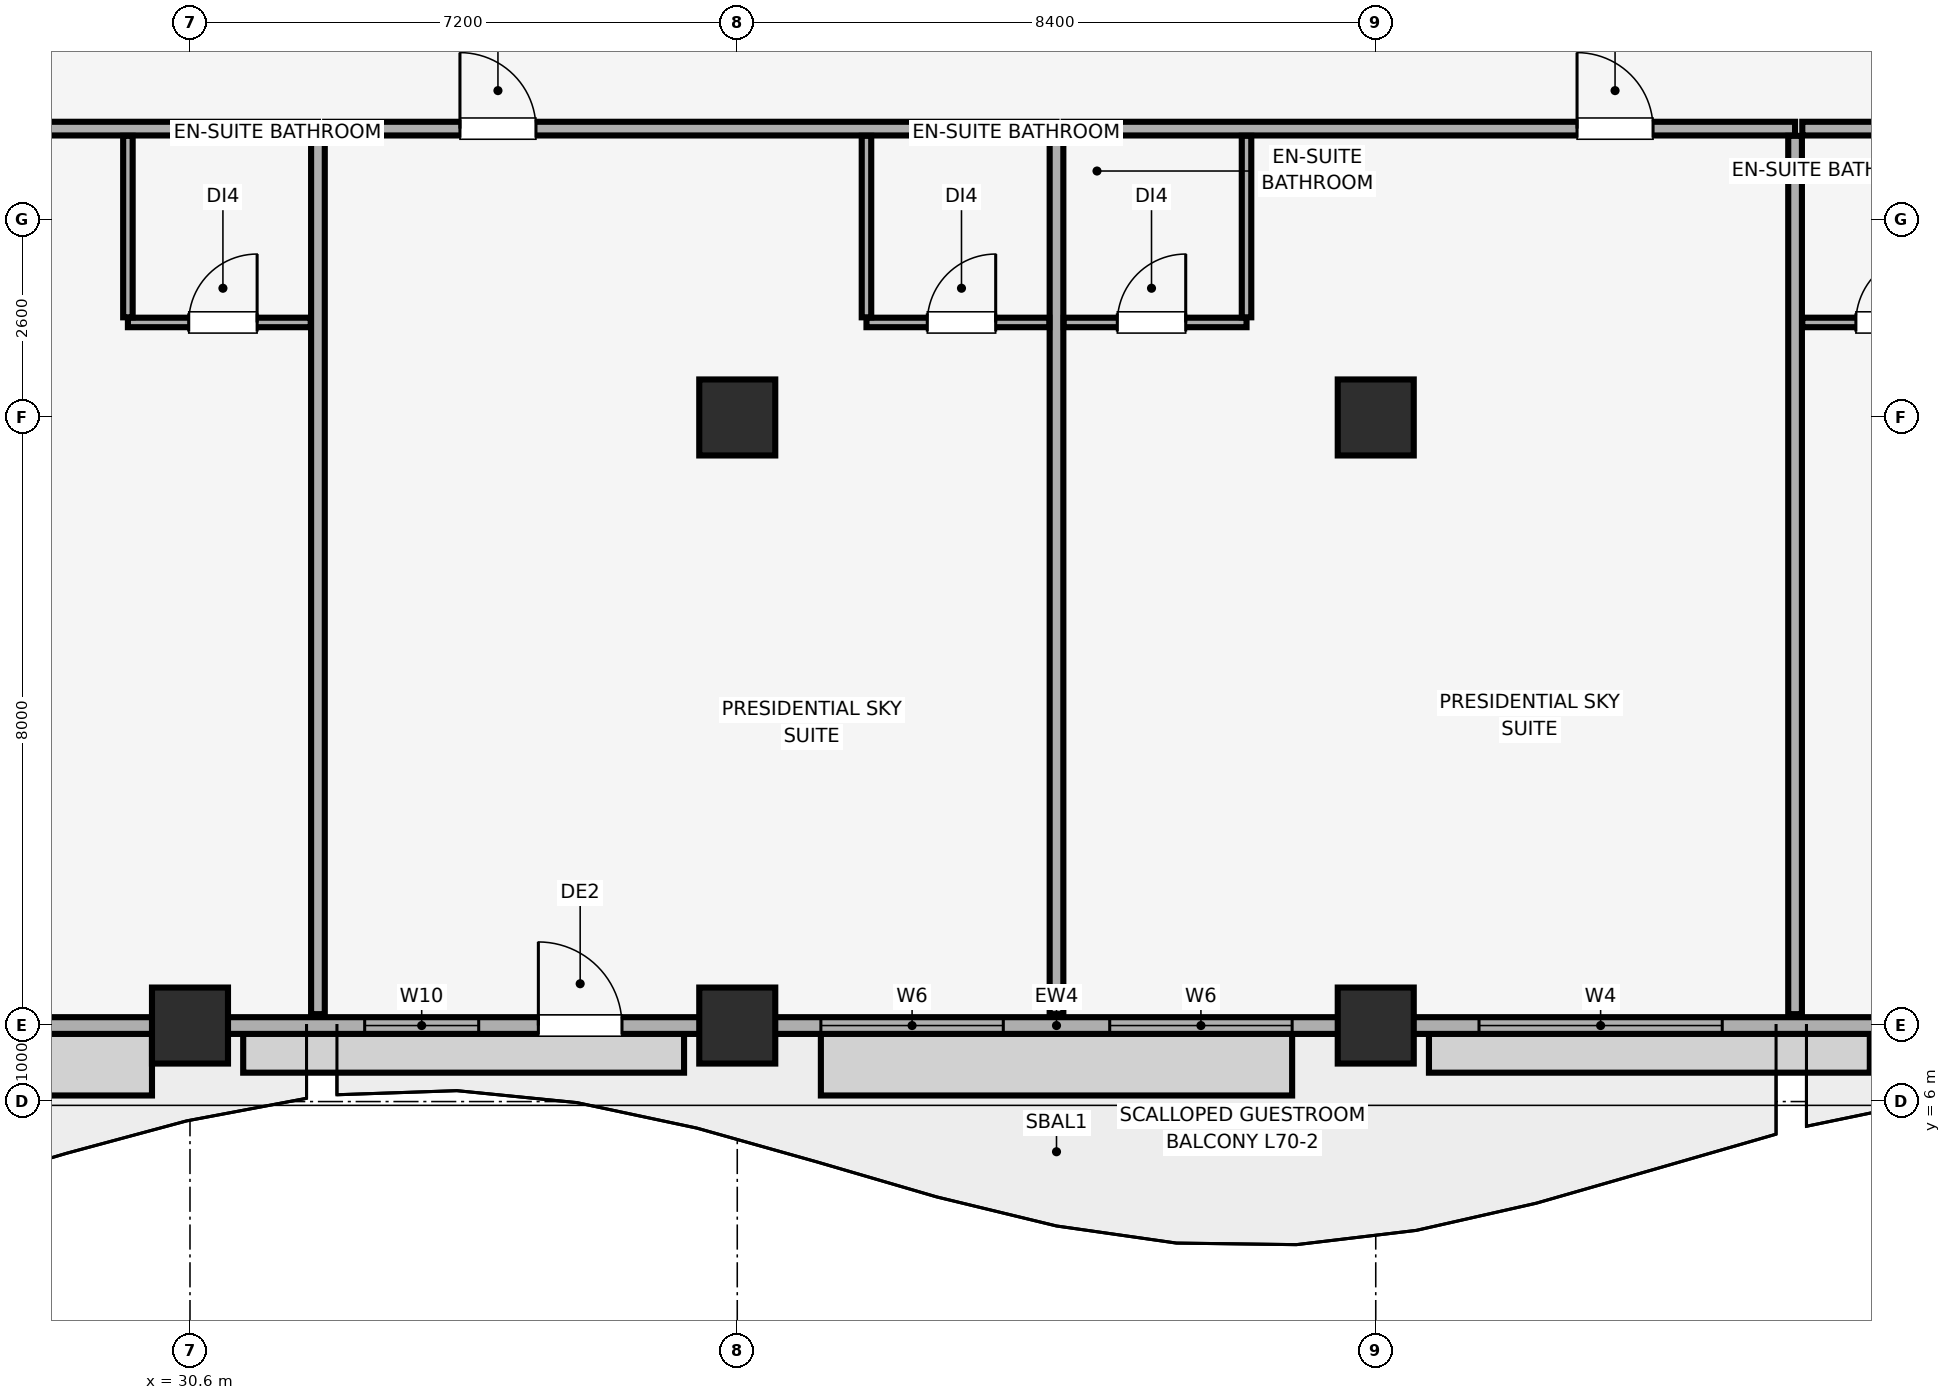
"""IFC4 building model, lengths in metres.
Left out: names, types, materials, properties, quantities, classifications, styles, units other than length and angle.
Written with IfcOpenShell. Run it as: python <this file> out.ifc"""

import sys

from ifc_helpers import new_model, si_unit, direction, frame, frame_2d, origin, origin_2d, place, context, subcontext, project, spatial, rectangle, extrude, element, fill, save


model = new_model("IFC4")
c1 = context("Model", 3, precision=1e-05, world=origin(), true_north=direction((0.0, 1.0)))
c2 = subcontext(c1, "Body", "Model", "MODEL_VIEW")
j1 = project(units=[si_unit("LENGTHUNIT", "METRE"), si_unit("PLANEANGLEUNIT", "RADIAN")], contexts=[c1])
p1 = place(None, origin())
s1 = spatial("IfcSite", under=j1, at=p1, CompositionType="ELEMENT")
p2 = place(p1, origin())
s2 = spatial("IfcBuilding", under=s1, at=p2, CompositionType="ELEMENT")
p3 = place(p2, frame((0.0, 0.0, 285.9)))
s3 = spatial("IfcBuildingStorey", under=s2, at=p3, CompositionType="ELEMENT", Elevation=285.9)
for number, where, z_axis, x_axis in (
    (1, (30.6, 7.0, 0.0), (0.0, 0.0, 1.0), (1.0, 0.0, 0.0)),
    (2, (37.8, 7.0, 0.0), (0.0, 0.0, 1.0), (1.0, 0.0, 0.0)),
    (3, (46.2, 7.0, 0.0), (0.0, 0.0, 1.0), (1.0, 0.0, 0.0)),
    (4, (37.8, 15.0, 0.0), (0.0, 0.0, 1.0), (1.0, 0.0, 0.0)),
    (5, (46.2, 15.0, 0.0), (0.0, 0.0, 1.0), (1.0, 0.0, 0.0)),
):
    element("IfcColumn", number, at=place(p3, frame(where, z_axis=z_axis, x_axis=x_axis)), inside=s3, PredefinedType="COLUMN", context=c2, shape_type="SweptSolid", body=[
        extrude(rectangle(XDim=1.0, YDim=1.0, at=origin_2d()), origin(), (0.0, 0.0, 1.0), 4.1),
    ])
p4 = place(p3, frame((12.6, 7.0, 0.0), z_axis=(0.0, 0.0, 1.0), x_axis=(1.0, 0.0, 0.0)))
e6 = element("IfcWall", 6, at=p4, inside=s3, PredefinedType="SOLIDWALL", context=c2, shape_type="SweptSolid", body=[
    extrude(rectangle(XDim=58.8, YDim=0.22, at=frame_2d((29.4, 0.0))), origin(), (0.0, 0.0, 1.0), 3.3),
])
p5 = place(p4, frame((7.917, 0.0, 0.0)))
e7 = element("IfcOpeningElement", 7, at=p5, cuts=e6, PredefinedType="OPENING", context=c2, shape_type="SweptSolid", body=[
    extrude(rectangle(XDim=1.1, YDim=2.15, at=frame_2d((0.55, 1.075))), frame((0.0, 0.12, 0.0), z_axis=(0.0, -1.0, 0.0), x_axis=(1.0, 0.0, 0.0)), (0.0, 0.0, 1.0), 0.24),
])
p6 = place(p4, frame((22.583, 0.0, 0.0)))
e8 = element("IfcOpeningElement", 8, at=p6, cuts=e6, PredefinedType="OPENING", context=c2, shape_type="SweptSolid", body=[
    extrude(rectangle(XDim=1.1, YDim=2.15, at=frame_2d((0.55, 1.075))), frame((0.0, 0.12, 0.0), z_axis=(0.0, -1.0, 0.0), x_axis=(1.0, 0.0, 0.0)), (0.0, 0.0, 1.0), 0.24),
])
p7 = place(p4, frame((49.783, 0.0, 0.0)))
e9 = element("IfcOpeningElement", 9, at=p7, cuts=e6, PredefinedType="OPENING", context=c2, shape_type="SweptSolid", body=[
    extrude(rectangle(XDim=1.1, YDim=2.15, at=frame_2d((0.55, 1.075))), frame((0.0, 0.12, 0.0), z_axis=(0.0, -1.0, 0.0), x_axis=(1.0, 0.0, 0.0)), (0.0, 0.0, 1.0), 0.24),
])
p8 = place(p4, frame((0.885, 0.0, 0.85)))
e10 = element("IfcOpeningElement", 10, at=p8, cuts=e6, PredefinedType="OPENING", context=c2, shape_type="SweptSolid", body=[
    extrude(rectangle(XDim=1.5, YDim=1.4, at=frame_2d((0.75, 0.7))), frame((0.0, 0.12, 0.0), z_axis=(0.0, -1.0, 0.0), x_axis=(1.0, 0.0, 0.0)), (0.0, 0.0, 1.0), 0.24),
])
p9 = place(p4, frame((4.673, 0.0, 0.85)))
e11 = element("IfcOpeningElement", 11, at=p9, cuts=e6, PredefinedType="OPENING", context=c2, shape_type="SweptSolid", body=[
    extrude(rectangle(XDim=2.4, YDim=1.5, at=frame_2d((1.2, 0.75))), frame((0.0, 0.12, 0.0), z_axis=(0.0, -1.0, 0.0), x_axis=(1.0, 0.0, 0.0)), (0.0, 0.0, 1.0), 0.24),
])
p10 = place(p4, frame((12.8, 0.0, 0.85)))
e12 = element("IfcOpeningElement", 12, at=p10, cuts=e6, PredefinedType="OPENING", context=c2, shape_type="SweptSolid", body=[
    extrude(rectangle(XDim=3.2, YDim=1.85, at=frame_2d((1.6, 0.925))), frame((0.0, 0.12, 0.0), z_axis=(0.0, -1.0, 0.0), x_axis=(1.0, 0.0, 0.0)), (0.0, 0.0, 1.0), 0.24),
])
p11 = place(p4, frame((20.298, 0.0, 0.85)))
e13 = element("IfcOpeningElement", 13, at=p11, cuts=e6, PredefinedType="OPENING", context=c2, shape_type="SweptSolid", body=[
    extrude(rectangle(XDim=1.5, YDim=1.4, at=frame_2d((0.75, 0.7))), frame((0.0, 0.12, 0.0), z_axis=(0.0, -1.0, 0.0), x_axis=(1.0, 0.0, 0.0)), (0.0, 0.0, 1.0), 0.24),
])
p12 = place(p4, frame((26.3, 0.0, 0.85)))
e14 = element("IfcOpeningElement", 14, at=p12, cuts=e6, PredefinedType="OPENING", context=c2, shape_type="SweptSolid", body=[
    extrude(rectangle(XDim=2.4, YDim=1.5, at=frame_2d((1.2, 0.75))), frame((0.0, 0.12, 0.0), z_axis=(0.0, -1.0, 0.0), x_axis=(1.0, 0.0, 0.0)), (0.0, 0.0, 1.0), 0.24),
])
p13 = place(p4, frame((30.1, 0.0, 0.85)))
e15 = element("IfcOpeningElement", 15, at=p13, cuts=e6, PredefinedType="OPENING", context=c2, shape_type="SweptSolid", body=[
    extrude(rectangle(XDim=2.4, YDim=1.5, at=frame_2d((1.2, 0.75))), frame((0.0, 0.12, 0.0), z_axis=(0.0, -1.0, 0.0), x_axis=(1.0, 0.0, 0.0)), (0.0, 0.0, 1.0), 0.24),
])
p14 = place(p4, frame((34.958, 0.0, 0.85)))
e16 = element("IfcOpeningElement", 16, at=p14, cuts=e6, PredefinedType="OPENING", context=c2, shape_type="SweptSolid", body=[
    extrude(rectangle(XDim=3.2, YDim=1.85, at=frame_2d((1.6, 0.925))), frame((0.0, 0.12, 0.0), z_axis=(0.0, -1.0, 0.0), x_axis=(1.0, 0.0, 0.0)), (0.0, 0.0, 1.0), 0.24),
])
p15 = place(p4, frame((42.8, 0.0, 0.85)))
e17 = element("IfcOpeningElement", 17, at=p15, cuts=e6, PredefinedType="OPENING", context=c2, shape_type="SweptSolid", body=[
    extrude(rectangle(XDim=3.2, YDim=1.85, at=frame_2d((1.6, 0.925))), frame((0.0, 0.12, 0.0), z_axis=(0.0, -1.0, 0.0), x_axis=(1.0, 0.0, 0.0)), (0.0, 0.0, 1.0), 0.24),
])
p16 = place(p4, frame((51.727, 0.0, 0.85)))
e18 = element("IfcOpeningElement", 18, at=p16, cuts=e6, PredefinedType="OPENING", context=c2, shape_type="SweptSolid", body=[
    extrude(rectangle(XDim=2.4, YDim=1.5, at=frame_2d((1.2, 0.75))), frame((0.0, 0.12, 0.0), z_axis=(0.0, -1.0, 0.0), x_axis=(1.0, 0.0, 0.0)), (0.0, 0.0, 1.0), 0.24),
])
p17 = place(p4, frame((56.415, 0.0, 0.85)))
e19 = element("IfcOpeningElement", 19, at=p17, cuts=e6, PredefinedType="OPENING", context=c2, shape_type="SweptSolid", body=[
    extrude(rectangle(XDim=1.5, YDim=1.4, at=frame_2d((0.75, 0.7))), frame((0.0, 0.12, 0.0), z_axis=(0.0, -1.0, 0.0), x_axis=(1.0, 0.0, 0.0)), (0.0, 0.0, 1.0), 0.24),
])
p18 = place(p3, frame((22.662, 18.8, 0.0), z_axis=(0.0, 0.0, 1.0), x_axis=(1.0, 0.0, 0.0)))
e20 = element("IfcWall", 20, at=p18, inside=s3, PredefinedType="PARTITIONING", context=c2, shape_type="SweptSolid", body=[
    extrude(rectangle(XDim=9.622, YDim=0.18, at=frame_2d((4.811, 0.0))), origin(), (0.0, 0.0, 1.0), 4.1),
])
p19 = place(p18, frame((3.37, 0.0, 0.0)))
e21 = element("IfcOpeningElement", 21, at=p19, cuts=e20, PredefinedType="OPENING", context=c2, shape_type="SweptSolid", body=[
    extrude(rectangle(XDim=1.0, YDim=2.15, at=frame_2d((0.5, 1.075))), frame((0.0, 0.1, 0.0), z_axis=(0.0, -1.0, 0.0), x_axis=(1.0, 0.0, 0.0)), (0.0, 0.0, 1.0), 0.2),
])
p20 = place(p3, frame((32.283, 7.15, 0.0), z_axis=(0.0, 0.0, 1.0), x_axis=(0.0, 1.0, 0.0)))
e22 = element("IfcWall", 22, at=p20, inside=s3, PredefinedType="PARTITIONING", context=c2, shape_type="SweptSolid", body=[
    extrude(rectangle(XDim=11.555, YDim=0.18, at=frame_2d((5.778, 0.0))), origin(), (0.0, 0.0, 1.0), 4.1),
])
p21 = place(p3, frame((29.783, 16.25, 0.0), z_axis=(0.0, 0.0, 1.0), x_axis=(1.0, 0.0, 0.0)))
e23 = element("IfcWall", 23, at=p21, inside=s3, PredefinedType="PARTITIONING", context=c2, shape_type="SweptSolid", body=[
    extrude(rectangle(XDim=2.405, YDim=0.125, at=frame_2d((1.203, 0.0))), origin(), (0.0, 0.0, 1.0), 4.1),
])
p22 = place(p21, frame((0.8, 0.0, 0.0)))
e24 = element("IfcOpeningElement", 24, at=p22, cuts=e23, PredefinedType="OPENING", context=c2, shape_type="SweptSolid", body=[
    extrude(rectangle(XDim=0.9, YDim=2.1, at=frame_2d((0.45, 1.05))), frame((0.0, 0.073, 0.0), z_axis=(0.0, -1.0, 0.0), x_axis=(1.0, 0.0, 0.0)), (0.0, 0.0, 1.0), 0.145),
])
p23 = place(p3, frame((29.783, 16.317, 0.0), z_axis=(0.0, 0.0, 1.0), x_axis=(0.0, 1.0, 0.0)))
e25 = element("IfcWall", 25, at=p23, inside=s3, PredefinedType="PARTITIONING", context=c2, shape_type="SweptSolid", body=[
    extrude(rectangle(XDim=2.388, YDim=0.125, at=frame_2d((1.194, 0.0))), origin(), (0.0, 0.0, 1.0), 4.1),
])
p24 = place(p3, frame((32.378, 18.8, 0.0), z_axis=(0.0, 0.0, 1.0), x_axis=(1.0, 0.0, 0.0)))
e26 = element("IfcWall", 26, at=p24, inside=s3, PredefinedType="PARTITIONING", context=c2, shape_type="SweptSolid", body=[
    extrude(rectangle(XDim=9.622, YDim=0.18, at=frame_2d((4.811, 0.0))), origin(), (0.0, 0.0, 1.0), 4.1),
])
p25 = place(p24, frame((1.773, 0.0, 0.0)))
e27 = element("IfcOpeningElement", 27, at=p25, cuts=e26, PredefinedType="OPENING", context=c2, shape_type="SweptSolid", body=[
    extrude(rectangle(XDim=1.0, YDim=2.15, at=frame_2d((0.5, 1.075))), frame((0.0, 0.1, 0.0), z_axis=(0.0, -1.0, 0.0), x_axis=(1.0, 0.0, 0.0)), (0.0, 0.0, 1.0), 0.2),
])
p26 = place(p3, frame((42.0, 7.15, 0.0), z_axis=(0.0, 0.0, 1.0), x_axis=(0.0, 1.0, 0.0)))
e28 = element("IfcWall", 28, at=p26, inside=s3, PredefinedType="PARTITIONING", context=c2, shape_type="SweptSolid", body=[
    extrude(rectangle(XDim=11.555, YDim=0.18, at=frame_2d((5.778, 0.0))), origin(), (0.0, 0.0, 1.0), 3.7),
])
p27 = place(p3, frame((39.5, 16.25, 0.0), z_axis=(0.0, 0.0, 1.0), x_axis=(1.0, 0.0, 0.0)))
e29 = element("IfcWall", 29, at=p27, inside=s3, PredefinedType="PARTITIONING", context=c2, shape_type="SweptSolid", body=[
    extrude(rectangle(XDim=2.405, YDim=0.125, at=frame_2d((1.203, 0.0))), origin(), (0.0, 0.0, 1.0), 4.1),
])
p28 = place(p27, frame((0.8, 0.0, 0.0)))
e30 = element("IfcOpeningElement", 30, at=p28, cuts=e29, PredefinedType="OPENING", context=c2, shape_type="SweptSolid", body=[
    extrude(rectangle(XDim=0.9, YDim=2.1, at=frame_2d((0.45, 1.05))), frame((0.0, 0.073, 0.0), z_axis=(0.0, -1.0, 0.0), x_axis=(1.0, 0.0, 0.0)), (0.0, 0.0, 1.0), 0.145),
])
p29 = place(p3, frame((39.5, 16.317, 0.0), z_axis=(0.0, 0.0, 1.0), x_axis=(0.0, 1.0, 0.0)))
e31 = element("IfcWall", 31, at=p29, inside=s3, PredefinedType="PARTITIONING", context=c2, shape_type="SweptSolid", body=[
    extrude(rectangle(XDim=2.388, YDim=0.125, at=frame_2d((1.194, 0.0))), origin(), (0.0, 0.0, 1.0), 4.1),
])
p30 = place(p3, frame((42.095, 18.8, 0.0), z_axis=(0.0, 0.0, 1.0), x_axis=(1.0, 0.0, 0.0)))
e32 = element("IfcWall", 32, at=p30, inside=s3, PredefinedType="PARTITIONING", context=c2, shape_type="SweptSolid", body=[
    extrude(rectangle(XDim=9.622, YDim=0.18, at=frame_2d((4.811, 0.0))), origin(), (0.0, 0.0, 1.0), 4.1),
])
p31 = place(p30, frame((6.753, 0.0, 0.0)))
e33 = element("IfcOpeningElement", 33, at=p31, cuts=e32, PredefinedType="OPENING", context=c2, shape_type="SweptSolid", body=[
    extrude(rectangle(XDim=1.0, YDim=2.15, at=frame_2d((0.5, 1.075))), frame((0.0, 0.1, 0.0), z_axis=(0.0, -1.0, 0.0), x_axis=(1.0, 0.0, 0.0)), (0.0, 0.0, 1.0), 0.2),
])
p32 = place(p3, frame((51.717, 7.15, 0.0), z_axis=(0.0, 0.0, 1.0), x_axis=(0.0, 1.0, 0.0)))
e34 = element("IfcWall", 34, at=p32, inside=s3, PredefinedType="PARTITIONING", context=c2, shape_type="SweptSolid", body=[
    extrude(rectangle(XDim=11.555, YDim=0.18, at=frame_2d((5.778, 0.0))), origin(), (0.0, 0.0, 1.0), 4.1),
])
p33 = place(p3, frame((42.095, 16.25, 0.0), z_axis=(0.0, 0.0, 1.0), x_axis=(1.0, 0.0, 0.0)))
e35 = element("IfcWall", 35, at=p33, inside=s3, PredefinedType="PARTITIONING", context=c2, shape_type="SweptSolid", body=[
    extrude(rectangle(XDim=2.405, YDim=0.125, at=frame_2d((1.203, 0.0))), origin(), (0.0, 0.0, 1.0), 4.1),
])
p34 = place(p33, frame((0.705, 0.0, 0.0)))
e36 = element("IfcOpeningElement", 36, at=p34, cuts=e35, PredefinedType="OPENING", context=c2, shape_type="SweptSolid", body=[
    extrude(rectangle(XDim=0.9, YDim=2.1, at=frame_2d((0.45, 1.05))), frame((0.0, 0.073, 0.0), z_axis=(0.0, -1.0, 0.0), x_axis=(1.0, 0.0, 0.0)), (0.0, 0.0, 1.0), 0.145),
])
p35 = place(p3, frame((44.5, 16.317, 0.0), z_axis=(0.0, 0.0, 1.0), x_axis=(0.0, 1.0, 0.0)))
e37 = element("IfcWall", 37, at=p35, inside=s3, PredefinedType="PARTITIONING", context=c2, shape_type="SweptSolid", body=[
    extrude(rectangle(XDim=2.388, YDim=0.125, at=frame_2d((1.194, 0.0))), origin(), (0.0, 0.0, 1.0), 4.1),
])
p36 = place(p3, frame((51.812, 18.8, 0.0), z_axis=(0.0, 0.0, 1.0), x_axis=(1.0, 0.0, 0.0)))
e38 = element("IfcWall", 38, at=p36, inside=s3, PredefinedType="PARTITIONING", context=c2, shape_type="SweptSolid", body=[
    extrude(rectangle(XDim=9.622, YDim=0.18, at=frame_2d((4.811, 0.0))), origin(), (0.0, 0.0, 1.0), 4.1),
])
p37 = place(p36, frame((5.157, 0.0, 0.0)))
e39 = element("IfcOpeningElement", 39, at=p37, cuts=e38, PredefinedType="OPENING", context=c2, shape_type="SweptSolid", body=[
    extrude(rectangle(XDim=1.0, YDim=2.15, at=frame_2d((0.5, 1.075))), frame((0.0, 0.1, 0.0), z_axis=(0.0, -1.0, 0.0), x_axis=(1.0, 0.0, 0.0)), (0.0, 0.0, 1.0), 0.2),
])
p38 = place(p3, frame((51.812, 16.25, 0.0), z_axis=(0.0, 0.0, 1.0), x_axis=(1.0, 0.0, 0.0)))
e40 = element("IfcWall", 40, at=p38, inside=s3, PredefinedType="PARTITIONING", context=c2, shape_type="SweptSolid", body=[
    extrude(rectangle(XDim=2.405, YDim=0.125, at=frame_2d((1.203, 0.0))), origin(), (0.0, 0.0, 1.0), 4.1),
])
p39 = place(p38, frame((0.705, 0.0, 0.0)))
e41 = element("IfcOpeningElement", 41, at=p39, cuts=e40, PredefinedType="OPENING", context=c2, shape_type="SweptSolid", body=[
    extrude(rectangle(XDim=0.9, YDim=2.1, at=frame_2d((0.45, 1.05))), frame((0.0, 0.073, 0.0), z_axis=(0.0, -1.0, 0.0), x_axis=(1.0, 0.0, 0.0)), (0.0, 0.0, 1.0), 0.145),
])
p40 = place(p6, origin())
e42 = element("IfcDoor", 42, at=p40, inside=s3, OperationType="SINGLE_SWING_LEFT", PredefinedType="DOOR", context=c2, shape_type="SweptSolid", body=[
    extrude(rectangle(XDim=1.1, YDim=2.15, at=frame_2d((0.55, 1.075))), frame((0.0, 0.025, 0.0), z_axis=(0.0, -1.0, 0.0), x_axis=(1.0, 0.0, 0.0)), (0.0, 0.0, 1.0), 0.05),
])
fill(e8, e42)
p41 = place(p11, origin())
e43 = element("IfcWindow", 43, at=p41, inside=s3, PartitioningType="SINGLE_PANEL", PredefinedType="WINDOW", context=c2, shape_type="SweptSolid", body=[
    extrude(rectangle(XDim=1.5, YDim=1.4, at=frame_2d((0.75, 0.7))), frame((0.0, 0.03, 0.0), z_axis=(0.0, -1.0, 0.0), x_axis=(1.0, 0.0, 0.0)), (0.0, 0.0, 1.0), 0.06),
])
fill(e13, e43)
p42 = place(p12, origin())
e44 = element("IfcWindow", 44, at=p42, inside=s3, PartitioningType="SINGLE_PANEL", PredefinedType="WINDOW", context=c2, shape_type="SweptSolid", body=[
    extrude(rectangle(XDim=2.4, YDim=1.5, at=frame_2d((1.2, 0.75))), frame((0.0, 0.03, 0.0), z_axis=(0.0, -1.0, 0.0), x_axis=(1.0, 0.0, 0.0)), (0.0, 0.0, 1.0), 0.06),
])
fill(e14, e44)
p43 = place(p13, origin())
e45 = element("IfcWindow", 45, at=p43, inside=s3, PartitioningType="SINGLE_PANEL", PredefinedType="WINDOW", context=c2, shape_type="SweptSolid", body=[
    extrude(rectangle(XDim=2.4, YDim=1.5, at=frame_2d((1.2, 0.75))), frame((0.0, 0.03, 0.0), z_axis=(0.0, -1.0, 0.0), x_axis=(1.0, 0.0, 0.0)), (0.0, 0.0, 1.0), 0.06),
])
fill(e15, e45)
p44 = place(p14, origin())
e46 = element("IfcWindow", 46, at=p44, inside=s3, PartitioningType="SINGLE_PANEL", PredefinedType="WINDOW", context=c2, shape_type="SweptSolid", body=[
    extrude(rectangle(XDim=3.2, YDim=1.85, at=frame_2d((1.6, 0.925))), frame((0.0, 0.03, 0.0), z_axis=(0.0, -1.0, 0.0), x_axis=(1.0, 0.0, 0.0)), (0.0, 0.0, 1.0), 0.06),
])
fill(e16, e46)
p45 = place(p22, origin())
e47 = element("IfcDoor", 47, at=p45, inside=s3, OperationType="SINGLE_SWING_RIGHT", PredefinedType="DOOR", context=c2, shape_type="SweptSolid", body=[
    extrude(rectangle(XDim=0.9, YDim=2.1, at=frame_2d((0.45, 1.05))), frame((0.0, 0.025, 0.0), z_axis=(0.0, -1.0, 0.0), x_axis=(1.0, 0.0, 0.0)), (0.0, 0.0, 1.0), 0.05),
])
fill(e24, e47)
p46 = place(p25, origin())
e48 = element("IfcDoor", 48, at=p46, inside=s3, OperationType="SINGLE_SWING_LEFT", PredefinedType="DOOR", context=c2, shape_type="SweptSolid", body=[
    extrude(rectangle(XDim=1.0, YDim=2.15, at=frame_2d((0.5, 1.075))), frame((0.0, 0.025, 0.0), z_axis=(0.0, -1.0, 0.0), x_axis=(1.0, 0.0, 0.0)), (0.0, 0.0, 1.0), 0.05),
])
fill(e27, e48)
p47 = place(p28, origin())
e49 = element("IfcDoor", 49, at=p47, inside=s3, OperationType="SINGLE_SWING_RIGHT", PredefinedType="DOOR", context=c2, shape_type="SweptSolid", body=[
    extrude(rectangle(XDim=0.9, YDim=2.1, at=frame_2d((0.45, 1.05))), frame((0.0, 0.025, 0.0), z_axis=(0.0, -1.0, 0.0), x_axis=(1.0, 0.0, 0.0)), (0.0, 0.0, 1.0), 0.05),
])
fill(e30, e49)
p48 = place(p31, origin())
e50 = element("IfcDoor", 50, at=p48, inside=s3, OperationType="SINGLE_SWING_LEFT", PredefinedType="DOOR", context=c2, shape_type="SweptSolid", body=[
    extrude(rectangle(XDim=1.0, YDim=2.15, at=frame_2d((0.5, 1.075))), frame((0.0, 0.025, 0.0), z_axis=(0.0, -1.0, 0.0), x_axis=(1.0, 0.0, 0.0)), (0.0, 0.0, 1.0), 0.05),
])
fill(e33, e50)
p49 = place(p34, origin())
e51 = element("IfcDoor", 51, at=p49, inside=s3, OperationType="SINGLE_SWING_RIGHT", PredefinedType="DOOR", context=c2, shape_type="SweptSolid", body=[
    extrude(rectangle(XDim=0.9, YDim=2.1, at=frame_2d((0.45, 1.05))), frame((0.0, 0.025, 0.0), z_axis=(0.0, -1.0, 0.0), x_axis=(1.0, 0.0, 0.0)), (0.0, 0.0, 1.0), 0.05),
])
fill(e36, e51)
p50 = place(p39, origin())
e52 = element("IfcDoor", 52, at=p50, inside=s3, OperationType="SINGLE_SWING_RIGHT", PredefinedType="DOOR", context=c2, shape_type="SweptSolid", body=[
    extrude(rectangle(XDim=0.9, YDim=2.1, at=frame_2d((0.45, 1.05))), frame((0.0, 0.025, 0.0), z_axis=(0.0, -1.0, 0.0), x_axis=(1.0, 0.0, 0.0)), (0.0, 0.0, 1.0), 0.05),
])
fill(e41, e52)
save(model, sys.argv[1])
